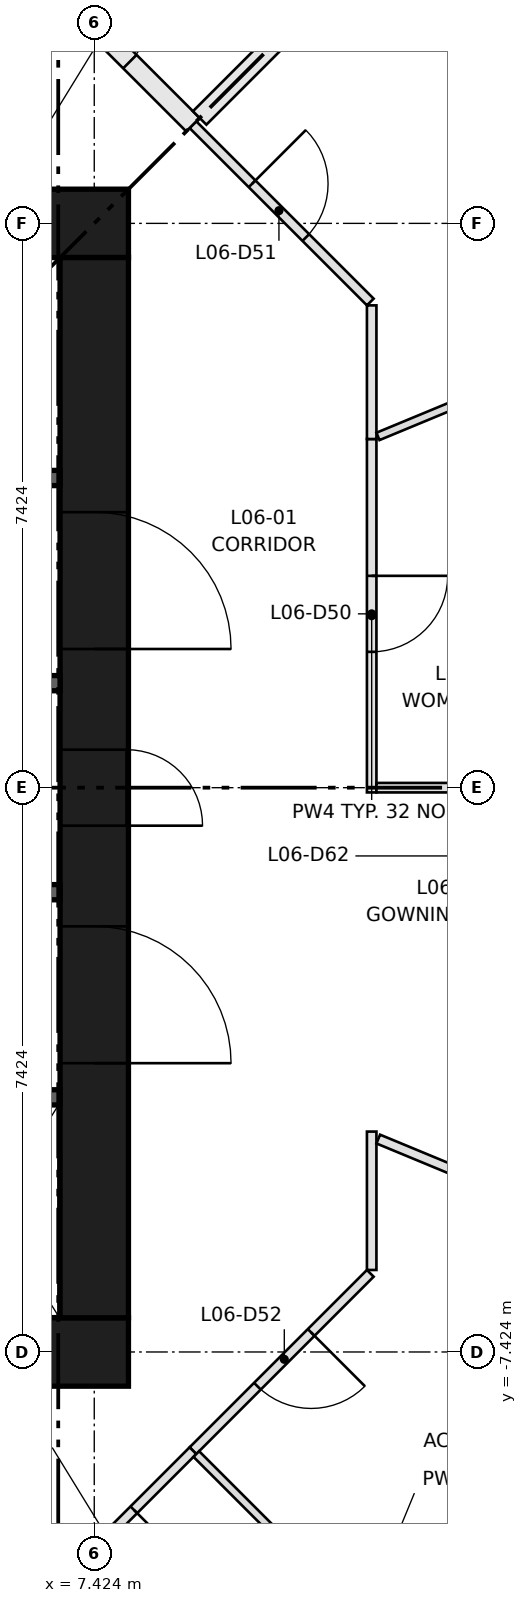
"""IFC4 building model, lengths in metres.
Left out: names, types, materials, properties, quantities, classifications, styles, units other than length and angle.
Written with IfcOpenShell. Run it as: python <this file> out.ifc"""

import sys

from ifc_helpers import new_model, si_unit, direction, frame, frame_2d, origin, place, context, subcontext, project, spatial, rectangle, extrude, element, fill, save


model = new_model("IFC4")
c1 = context("Model", 3, precision=1e-05, world=origin(), true_north=direction((0.0, 1.0)))
c2 = subcontext(c1, "Body", "Model", "MODEL_VIEW")
j1 = project(units=[si_unit("LENGTHUNIT", "METRE"), si_unit("PLANEANGLEUNIT", "RADIAN")], contexts=[c1])
p1 = place(None, origin())
s1 = spatial("IfcSite", under=j1, at=p1, CompositionType="ELEMENT")
p2 = place(p1, origin())
s2 = spatial("IfcBuilding", under=s1, at=p2, CompositionType="ELEMENT")
p3 = place(p2, frame((0.0, 0.0, 26.2)))
s3 = spatial("IfcBuildingStorey", under=s2, at=p3, CompositionType="ELEMENT", Elevation=26.2)
for number, where, z_axis, x_axis in (
    (1, (-7.874, -7.424, 0.0), (0.0, 0.0, 1.0), (1.0, 0.0, 0.0)),
    (2, (-7.874, 7.424, 0.0), (0.0, 0.0, 1.0), (1.0, 0.0, 0.0)),
):
    element("IfcWall", number, at=place(p3, frame(where, z_axis=z_axis, x_axis=x_axis)), inside=s3, PredefinedType="SHEAR", context=c2, shape_type="SweptSolid", body=[
        extrude(rectangle(XDim=15.748, YDim=0.9, at=frame_2d((7.874, 0.0))), origin(), (0.0, 0.0, 1.0), 3.65),
    ])
p4 = place(p3, frame((7.424, -6.974, 0.0), z_axis=(0.0, 0.0, 1.0), x_axis=(0.0, 1.0, 0.0)))
e3 = element("IfcWall", 3, at=p4, inside=s3, PredefinedType="SHEAR", context=c2, shape_type="SweptSolid", body=[
    extrude(rectangle(XDim=13.948, YDim=0.9, at=frame_2d((6.974, 0.0))), origin(), (0.0, 0.0, 1.0), 3.65),
])
p5 = place(p4, frame((6.474, 0.0, 0.0)))
e4 = element("IfcOpeningElement", 4, at=p5, cuts=e3, PredefinedType="OPENING", context=c2, shape_type="SweptSolid", body=[
    extrude(rectangle(XDim=1.0, YDim=2.1, at=frame_2d((0.5, 1.05))), frame((0.0, 0.46, 0.0), z_axis=(0.0, -1.0, 0.0), x_axis=(1.0, 0.0, 0.0)), (0.0, 0.0, 1.0), 0.92),
])
p6 = place(p4, frame((3.35, 0.0, 0.0)))
e5 = element("IfcOpeningElement", 5, at=p6, cuts=e3, PredefinedType="OPENING", context=c2, shape_type="SweptSolid", body=[
    extrude(rectangle(XDim=1.8, YDim=2.1, at=frame_2d((0.9, 1.05))), frame((0.0, 0.46, 0.0), z_axis=(0.0, -1.0, 0.0), x_axis=(1.0, 0.0, 0.0)), (0.0, 0.0, 1.0), 0.92),
])
p7 = place(p4, frame((8.799, 0.0, 0.0)))
e6 = element("IfcOpeningElement", 6, at=p7, cuts=e3, PredefinedType="OPENING", context=c2, shape_type="SweptSolid", body=[
    extrude(rectangle(XDim=1.8, YDim=2.1, at=frame_2d((0.9, 1.05))), frame((0.0, 0.46, 0.0), z_axis=(0.0, -1.0, 0.0), x_axis=(1.0, 0.0, 0.0)), (0.0, 0.0, 1.0), 0.92),
])
p8 = place(p3, frame((-6.974, -4.074, 0.0), z_axis=(0.0, 0.0, 1.0), x_axis=(1.0, 0.0, 0.0)))
e7 = element("IfcWall", 7, at=p8, inside=s3, PredefinedType="SHEAR", context=c2, shape_type="SweptSolid", body=[
    extrude(rectangle(XDim=13.948, YDim=0.2, at=frame_2d((6.974, 0.0))), origin(), (0.0, 0.0, 1.0), 3.3),
])
p9 = place(p8, frame((0.918, 0.0, 0.0)))
e8 = element("IfcOpeningElement", 8, at=p9, cuts=e7, PredefinedType="OPENING", context=c2, shape_type="SweptSolid", body=[
    extrude(rectangle(XDim=1.1, YDim=2.1, at=frame_2d((0.55, 1.05))), frame((0.0, 0.11, 0.0), z_axis=(0.0, -1.0, 0.0), x_axis=(1.0, 0.0, 0.0)), (0.0, 0.0, 1.0), 0.22),
])
p10 = place(p8, frame((4.055, 0.0, 0.0)))
e9 = element("IfcOpeningElement", 9, at=p10, cuts=e7, PredefinedType="OPENING", context=c2, shape_type="SweptSolid", body=[
    extrude(rectangle(XDim=1.1, YDim=2.1, at=frame_2d((0.55, 1.05))), frame((0.0, 0.11, 0.0), z_axis=(0.0, -1.0, 0.0), x_axis=(1.0, 0.0, 0.0)), (0.0, 0.0, 1.0), 0.22),
])
p11 = place(p8, frame((6.658, 0.0, 0.0)))
e10 = element("IfcOpeningElement", 10, at=p11, cuts=e7, PredefinedType="OPENING", context=c2, shape_type="SweptSolid", body=[
    extrude(rectangle(XDim=1.0, YDim=2.1, at=frame_2d((0.5, 1.05))), frame((0.0, 0.11, 0.0), z_axis=(0.0, -1.0, 0.0), x_axis=(1.0, 0.0, 0.0)), (0.0, 0.0, 1.0), 0.22),
])
p12 = place(p8, frame((8.627, 0.0, 0.0)))
e11 = element("IfcOpeningElement", 11, at=p12, cuts=e7, PredefinedType="OPENING", context=c2, shape_type="SweptSolid", body=[
    extrude(rectangle(XDim=1.0, YDim=2.1, at=frame_2d((0.5, 1.05))), frame((0.0, 0.11, 0.0), z_axis=(0.0, -1.0, 0.0), x_axis=(1.0, 0.0, 0.0)), (0.0, 0.0, 1.0), 0.22),
])
p13 = place(p8, frame((10.595, 0.0, 0.0)))
e12 = element("IfcOpeningElement", 12, at=p13, cuts=e7, PredefinedType="OPENING", context=c2, shape_type="SweptSolid", body=[
    extrude(rectangle(XDim=1.0, YDim=2.1, at=frame_2d((0.5, 1.05))), frame((0.0, 0.11, 0.0), z_axis=(0.0, -1.0, 0.0), x_axis=(1.0, 0.0, 0.0)), (0.0, 0.0, 1.0), 0.22),
])
p14 = place(p8, frame((12.564, 0.0, 0.0)))
e13 = element("IfcOpeningElement", 13, at=p14, cuts=e7, PredefinedType="OPENING", context=c2, shape_type="SweptSolid", body=[
    extrude(rectangle(XDim=1.0, YDim=2.1, at=frame_2d((0.5, 1.05))), frame((0.0, 0.11, 0.0), z_axis=(0.0, -1.0, 0.0), x_axis=(1.0, 0.0, 0.0)), (0.0, 0.0, 1.0), 0.22),
])
p15 = place(p3, frame((0.0, 4.074, 0.0), z_axis=(0.0, 0.0, 1.0), x_axis=(1.0, 0.0, 0.0)))
e14 = element("IfcWall", 14, at=p15, inside=s3, PredefinedType="SHEAR", context=c2, shape_type="SweptSolid", body=[
    extrude(rectangle(XDim=6.974, YDim=0.2, at=frame_2d((3.487, 0.0))), origin(), (0.0, 0.0, 1.0), 3.3),
])
p16 = place(p15, frame((0.43, 0.0, 0.0)))
e15 = element("IfcOpeningElement", 15, at=p16, cuts=e14, PredefinedType="OPENING", context=c2, shape_type="SweptSolid", body=[
    extrude(rectangle(XDim=1.0, YDim=2.1, at=frame_2d((0.5, 1.05))), frame((0.0, 0.11, 0.0), z_axis=(0.0, -1.0, 0.0), x_axis=(1.0, 0.0, 0.0)), (0.0, 0.0, 1.0), 0.22),
])
p17 = place(p15, frame((2.153, 0.0, 0.0)))
e16 = element("IfcOpeningElement", 16, at=p17, cuts=e14, PredefinedType="OPENING", context=c2, shape_type="SweptSolid", body=[
    extrude(rectangle(XDim=1.0, YDim=2.1, at=frame_2d((0.5, 1.05))), frame((0.0, 0.11, 0.0), z_axis=(0.0, -1.0, 0.0), x_axis=(1.0, 0.0, 0.0)), (0.0, 0.0, 1.0), 0.22),
])
p18 = place(p15, frame((3.875, 0.0, 0.0)))
e17 = element("IfcOpeningElement", 17, at=p18, cuts=e14, PredefinedType="OPENING", context=c2, shape_type="SweptSolid", body=[
    extrude(rectangle(XDim=1.0, YDim=2.1, at=frame_2d((0.5, 1.05))), frame((0.0, 0.11, 0.0), z_axis=(0.0, -1.0, 0.0), x_axis=(1.0, 0.0, 0.0)), (0.0, 0.0, 1.0), 0.22),
])
p19 = place(p15, frame((5.79, 0.0, 0.0)))
e18 = element("IfcOpeningElement", 18, at=p19, cuts=e14, PredefinedType="OPENING", context=c2, shape_type="SweptSolid", body=[
    extrude(rectangle(XDim=0.8, YDim=2.1, at=frame_2d((0.4, 1.05))), frame((0.0, 0.11, 0.0), z_axis=(0.0, -1.0, 0.0), x_axis=(1.0, 0.0, 0.0)), (0.0, 0.0, 1.0), 0.22),
])
for number, where, z_axis, x_axis in (
    (19, (4.374, -1.375, 0.0), (0.0, 0.0, 1.0), (1.0, 0.0, 0.0)),
    (20, (4.374, 1.375, 0.0), (0.0, 0.0, 1.0), (1.0, 0.0, 0.0)),
):
    element("IfcWall", number, at=place(p3, frame(where, z_axis=z_axis, x_axis=x_axis)), inside=s3, PredefinedType="SHEAR", context=c2, shape_type="SweptSolid", body=[
        extrude(rectangle(XDim=2.6, YDim=0.2, at=frame_2d((1.3, 0.0))), origin(), (0.0, 0.0, 1.0), 3.3),
    ])
p20 = place(p3, frame((11.074, 4.587, 0.0), z_axis=(0.0, 0.0, 1.0), x_axis=(0.0, -1.0, 0.0)))
e21 = element("IfcWall", 21, at=p20, inside=s3, PredefinedType="PARTITIONING", context=c2, shape_type="SweptSolid", body=[
    extrude(rectangle(XDim=4.649, YDim=0.125, at=frame_2d((2.325, 0.0))), origin(), (0.0, 0.0, 1.0), 3.3),
])
p21 = place(p20, frame((1.8, 0.0, 0.0)))
e22 = element("IfcOpeningElement", 22, at=p21, cuts=e21, PredefinedType="OPENING", context=c2, shape_type="SweptSolid", body=[
    extrude(rectangle(XDim=1.0, YDim=2.1, at=frame_2d((0.5, 1.05))), frame((0.0, 0.073, 0.0), z_axis=(0.0, -1.0, 0.0), x_axis=(1.0, 0.0, 0.0)), (0.0, 0.0, 1.0), 0.145),
])
p22 = place(p3, frame((8.722, 8.722, 0.0), z_axis=(0.0, 0.0, 1.0), x_axis=(0.707143776336, -0.707069784102, 0.0)))
e23 = element("IfcWall", 23, at=p22, inside=s3, PredefinedType="PARTITIONING", context=c2, shape_type="SweptSolid", body=[
    extrude(rectangle(XDim=3.3, YDim=0.125, at=frame_2d((1.65, 0.0))), origin(), (0.0, 0.0, 1.0), 3.3),
])
p23 = place(p22, frame((1.1, 0.0, 0.0)))
e24 = element("IfcOpeningElement", 24, at=p23, cuts=e23, PredefinedType="OPENING", context=c2, shape_type="SweptSolid", body=[
    extrude(rectangle(XDim=1.0, YDim=2.1, at=frame_2d((0.5, 1.05))), frame((0.0, 0.073, 0.0), z_axis=(0.0, -1.0, 0.0), x_axis=(1.0, 0.0, 0.0)), (0.0, 0.0, 1.0), 0.145),
])
p24 = place(p3, frame((11.074, 6.345, 0.0), z_axis=(0.0, 0.0, 1.0), x_axis=(0.0, -1.0, 0.0)))
e25 = element("IfcWall", 25, at=p24, inside=s3, PredefinedType="PARTITIONING", context=c2, shape_type="SweptSolid", body=[
    extrude(rectangle(XDim=1.758, YDim=0.125, at=frame_2d((0.879, 0.0))), origin(), (0.0, 0.0, 1.0), 3.3),
])
p25 = place(p3, frame((11.056, -6.389, 0.0), z_axis=(0.0, 0.0, 1.0), x_axis=(-0.707143776336, -0.707069784102, 0.0)))
e26 = element("IfcWall", 26, at=p25, inside=s3, PredefinedType="PARTITIONING", context=c2, shape_type="SweptSolid", body=[
    extrude(rectangle(XDim=3.3, YDim=0.125, at=frame_2d((1.65, 0.0))), origin(), (0.0, 0.0, 1.0), 3.3),
])
p26 = place(p25, frame((1.1, 0.0, 0.0)))
e27 = element("IfcOpeningElement", 27, at=p26, cuts=e26, PredefinedType="OPENING", context=c2, shape_type="SweptSolid", body=[
    extrude(rectangle(XDim=1.0, YDim=2.1, at=frame_2d((0.5, 1.05))), frame((0.0, 0.073, 0.0), z_axis=(0.0, -1.0, 0.0), x_axis=(1.0, 0.0, 0.0)), (0.0, 0.0, 1.0), 0.145),
])
p27 = place(p3, frame((11.074, -4.524, 0.0), z_axis=(0.0, 0.0, 1.0), x_axis=(0.0, -1.0, 0.0)))
e28 = element("IfcWall", 28, at=p27, inside=s3, PredefinedType="PARTITIONING", context=c2, shape_type="SweptSolid", body=[
    extrude(rectangle(XDim=1.821, YDim=0.125, at=frame_2d((0.91, 0.0))), origin(), (0.0, 0.0, 1.0), 3.3),
])
p28 = place(p3, frame((6.408, 11.037, 0.0), z_axis=(0.0, 0.0, 1.0), x_axis=(0.707069491442, -0.707144068965, 0.0)))
e29 = element("IfcWall", 29, at=p28, inside=s3, PredefinedType="PARTITIONING", context=c2, shape_type="SweptSolid", body=[
    extrude(rectangle(XDim=3.274, YDim=0.25, at=frame_2d((1.637, 0.0))), origin(), (0.0, 0.0, 1.0), 3.3),
])
p29 = place(p28, frame((1.1, 0.0, 0.0)))
e30 = element("IfcOpeningElement", 30, at=p29, cuts=e29, PredefinedType="OPENING", context=c2, shape_type="SweptSolid", body=[
    extrude(rectangle(XDim=1.0, YDim=2.1, at=frame_2d((0.5, 1.05))), frame((0.0, 0.135, 0.0), z_axis=(0.0, -1.0, 0.0), x_axis=(1.0, 0.0, 0.0)), (0.0, 0.0, 1.0), 0.27),
])
p30 = place(p3, frame((8.722, -8.722, 0.0), z_axis=(0.0, 0.0, 1.0), x_axis=(-0.707069784102, -0.707143776336, 0.0)))
e31 = element("IfcWall", 31, at=p30, inside=s3, PredefinedType="PARTITIONING", context=c2, shape_type="SweptSolid", body=[
    extrude(rectangle(XDim=3.3, YDim=0.125, at=frame_2d((1.65, 0.0))), origin(), (0.0, 0.0, 1.0), 3.3),
])
p31 = place(p30, frame((1.1, 0.0, 0.0)))
e32 = element("IfcOpeningElement", 32, at=p31, cuts=e31, PredefinedType="OPENING", context=c2, shape_type="SweptSolid", body=[
    extrude(rectangle(XDim=1.0, YDim=2.1, at=frame_2d((0.5, 1.05))), frame((0.0, 0.073, 0.0), z_axis=(0.0, -1.0, 0.0), x_axis=(1.0, 0.0, 0.0)), (0.0, 0.0, 1.0), 0.145),
])
p32 = place(p3, frame((11.156, 4.621, 0.0), z_axis=(0.0, 0.0, 1.0), x_axis=(0.923813438205, 0.382842959178, 0.0)))
e33 = element("IfcWall", 33, at=p32, inside=s3, PredefinedType="PARTITIONING", context=c2, shape_type="SweptSolid", body=[
    extrude(rectangle(XDim=1.624, YDim=0.105, at=frame_2d((0.812, 0.0))), origin(), (0.0, 0.0, 1.0), 3.3),
])
p33 = place(p3, frame((13.633, 0.0, 0.0), z_axis=(0.0, 0.0, 1.0), x_axis=(-1.0, 0.0, 0.0)))
e34 = element("IfcWall", 34, at=p33, inside=s3, PredefinedType="PARTITIONING", context=c2, shape_type="SweptSolid", body=[
    extrude(rectangle(XDim=2.497, YDim=0.125, at=frame_2d((1.249, 0.0))), origin(), (0.0, 0.0, 1.0), 3.3),
])
p34 = place(p3, frame((13.131, 13.131, 0.0), z_axis=(0.0, 0.0, 1.0), x_axis=(-0.707106781187, -0.707106781187, 0.0)))
e35 = element("IfcWall", 35, at=p34, inside=s3, PredefinedType="PARTITIONING", context=c2, shape_type="SweptSolid", body=[
    extrude(rectangle(XDim=6.11, YDim=0.25, at=frame_2d((3.055, 0.0))), origin(), (0.0, 0.0, 1.0), 3.3),
])
p35 = place(p3, frame((8.767, -8.767, 0.0), z_axis=(0.0, 0.0, 1.0), x_axis=(0.707106781187, -0.707106781187, 0.0)))
e36 = element("IfcWall", 36, at=p35, inside=s3, PredefinedType="PARTITIONING", context=c2, shape_type="SweptSolid", body=[
    extrude(rectangle(XDim=6.172, YDim=0.105, at=frame_2d((3.086, 0.0))), origin(), (0.0, 0.0, 1.0), 3.3),
])
p36 = place(p3, frame((11.16, -4.623, 0.0), z_axis=(0.0, 0.0, 1.0), x_axis=(0.92383312361, -0.382795454155, 0.0)))
e37 = element("IfcWall", 37, at=p36, inside=s3, PredefinedType="PARTITIONING", context=c2, shape_type="SweptSolid", body=[
    extrude(rectangle(XDim=1.62, YDim=0.125, at=frame_2d((0.81, 0.0))), origin(), (0.0, 0.0, 1.0), 3.3),
])
p37 = place(p5, frame((1.0, 0.0, 0.0), z_axis=(0.0, 0.0, 1.0), x_axis=(-1.0, 0.0, 0.0)))
e38 = element("IfcDoor", 38, at=p37, inside=s3, OperationType="SINGLE_SWING_LEFT", PredefinedType="DOOR", context=c2, shape_type="SweptSolid", body=[
    extrude(rectangle(XDim=1.0, YDim=2.1, at=frame_2d((0.5, 1.05))), frame((0.0, 0.45, 0.0), z_axis=(0.0, -1.0, 0.0), x_axis=(1.0, 0.0, 0.0)), (0.0, 0.0, 1.0), 0.05),
])
fill(e4, e38)
p38 = place(p6, frame((1.8, 0.0, 0.0), z_axis=(0.0, 0.0, 1.0), x_axis=(-1.0, 0.0, 0.0)))
e39 = element("IfcDoor", 39, at=p38, inside=s3, OperationType="DOUBLE_DOOR_SINGLE_SWING", PredefinedType="DOOR", context=c2, shape_type="SweptSolid", body=[
    extrude(rectangle(XDim=1.8, YDim=2.1, at=frame_2d((0.9, 1.05))), frame((0.0, 0.025, 0.0), z_axis=(0.0, -1.0, 0.0), x_axis=(1.0, 0.0, 0.0)), (0.0, 0.0, 1.0), 0.05),
])
fill(e5, e39)
p39 = place(p7, frame((1.8, 0.0, 0.0), z_axis=(0.0, 0.0, 1.0), x_axis=(-1.0, 0.0, 0.0)))
e40 = element("IfcDoor", 40, at=p39, inside=s3, OperationType="DOUBLE_DOOR_SINGLE_SWING", PredefinedType="DOOR", context=c2, shape_type="SweptSolid", body=[
    extrude(rectangle(XDim=1.8, YDim=2.1, at=frame_2d((0.9, 1.05))), frame((0.0, 0.025, 0.0), z_axis=(0.0, -1.0, 0.0), x_axis=(1.0, 0.0, 0.0)), (0.0, 0.0, 1.0), 0.05),
])
fill(e6, e40)
p40 = place(p21, origin())
e41 = element("IfcDoor", 41, at=p40, inside=s3, OperationType="SINGLE_SWING_LEFT", PredefinedType="DOOR", context=c2, shape_type="SweptSolid", body=[
    extrude(rectangle(XDim=1.0, YDim=2.1, at=frame_2d((0.5, 1.05))), frame((0.0, 0.025, 0.0), z_axis=(0.0, -1.0, 0.0), x_axis=(1.0, 0.0, 0.0)), (0.0, 0.0, 1.0), 0.05),
])
fill(e22, e41)
p41 = place(p23, origin())
e42 = element("IfcDoor", 42, at=p41, inside=s3, OperationType="SINGLE_SWING_LEFT", PredefinedType="DOOR", context=c2, shape_type="SweptSolid", body=[
    extrude(rectangle(XDim=1.0, YDim=2.1, at=frame_2d((0.5, 1.05))), frame((0.0, 0.025, 0.0), z_axis=(0.0, -1.0, 0.0), x_axis=(1.0, 0.0, 0.0)), (0.0, 0.0, 1.0), 0.05),
])
fill(e24, e42)
p42 = place(p26, origin())
e43 = element("IfcDoor", 43, at=p42, inside=s3, OperationType="SINGLE_SWING_LEFT", PredefinedType="DOOR", context=c2, shape_type="SweptSolid", body=[
    extrude(rectangle(XDim=1.0, YDim=2.1, at=frame_2d((0.5, 1.05))), frame((0.0, 0.025, 0.0), z_axis=(0.0, -1.0, 0.0), x_axis=(1.0, 0.0, 0.0)), (0.0, 0.0, 1.0), 0.05),
])
fill(e27, e43)
p43 = place(p29, origin())
e44 = element("IfcDoor", 44, at=p43, inside=s3, OperationType="SINGLE_SWING_LEFT", PredefinedType="DOOR", context=c2, shape_type="SweptSolid", body=[
    extrude(rectangle(XDim=1.0, YDim=2.1, at=frame_2d((0.5, 1.05))), frame((0.0, 0.025, 0.0), z_axis=(0.0, -1.0, 0.0), x_axis=(1.0, 0.0, 0.0)), (0.0, 0.0, 1.0), 0.05),
])
fill(e30, e44)
p44 = place(p31, origin())
e45 = element("IfcDoor", 45, at=p44, inside=s3, OperationType="SINGLE_SWING_LEFT", PredefinedType="DOOR", context=c2, shape_type="SweptSolid", body=[
    extrude(rectangle(XDim=1.0, YDim=2.1, at=frame_2d((0.5, 1.05))), frame((0.0, 0.025, 0.0), z_axis=(0.0, -1.0, 0.0), x_axis=(1.0, 0.0, 0.0)), (0.0, 0.0, 1.0), 0.05),
])
fill(e32, e45)
save(model, sys.argv[1])
